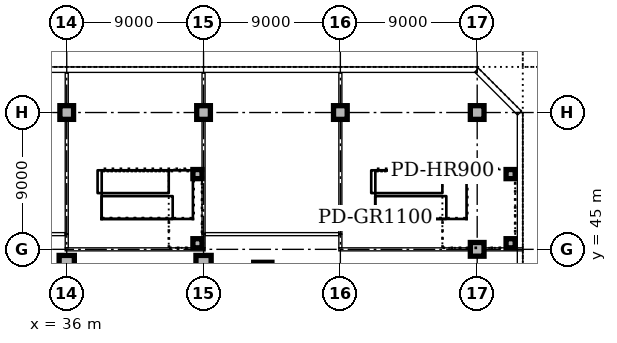
"""IFC4 building model, lengths in metres.
Left out: names, types, materials, properties, quantities, classifications, styles, units other than length and angle.
Written with IfcOpenShell. Run it as: python <this file> out.ifc"""

import sys

from ifc_helpers import new_model, si_unit, direction, frame, frame_2d, origin, origin_2d, place, context, subcontext, project, spatial, rectangle, extrude, element, fill, save


model = new_model("IFC4")
c1 = context("Model", 3, precision=1e-05, world=origin(), true_north=direction((0.0, 1.0)))
c2 = subcontext(c1, "Body", "Model", "MODEL_VIEW")
j1 = project(units=[si_unit("LENGTHUNIT", "METRE"), si_unit("PLANEANGLEUNIT", "RADIAN")], contexts=[c1])
p1 = place(None, origin())
s1 = spatial("IfcSite", under=j1, at=p1, CompositionType="ELEMENT")
p2 = place(p1, origin())
s2 = spatial("IfcBuilding", under=s1, at=p2, CompositionType="ELEMENT")
p3 = place(p2, origin())
s3 = spatial("IfcBuildingStorey", under=s2, at=p3, CompositionType="ELEMENT", Elevation=0.0)
p4 = place(p3, frame((48.898, 43.547, 0.0), z_axis=(0.0, 0.0, 1.0), x_axis=(1.0, 0.0, 0.0)))
e1 = element("IfcColumn", 1, at=p4, inside=s3, PredefinedType="COLUMN", context=c2, shape_type="SweptSolid", body=[
    extrude(rectangle(XDim=1.2, YDim=1.2, at=origin_2d()), origin(), (0.0, 0.0, 1.0), 5.7),
])
for number, where, z_axis, x_axis in (
    (2, (36.0, 44.1, 0.0), (0.0, 0.0, 1.0), (1.0, 0.0, 0.0)),
    (3, (45.0, 44.1, 0.0), (0.0, 0.0, 1.0), (1.0, 0.0, 0.0)),
):
    element("IfcColumn", number, at=place(p3, frame(where, z_axis=z_axis, x_axis=x_axis)), inside=s3, PredefinedType="COLUMN", context=c2, shape_type="SweptSolid", body=[
        extrude(rectangle(XDim=1.0, YDim=1.0, at=origin_2d()), origin(), (0.0, 0.0, 1.0), 5.7),
    ])
for number, where, z_axis, x_axis in (
    (4, (36.0, 54.0, 0.0), (0.0, 0.0, 1.0), (1.0, 0.0, 0.0)),
    (5, (45.0, 54.0, 0.0), (0.0, 0.0, 1.0), (1.0, 0.0, 0.0)),
    (6, (54.0, 54.0, 0.0), (0.0, 0.0, 1.0), (1.0, 0.0, 0.0)),
    (7, (63.0, 45.0, 0.0), (0.0, 0.0, 1.0), (1.0, 0.0, 0.0)),
    (8, (63.0, 54.0, 0.0), (0.0, 0.0, 1.0), (1.0, 0.0, 0.0)),
):
    element("IfcColumn", number, at=place(p3, frame(where, z_axis=z_axis, x_axis=x_axis)), inside=s3, PredefinedType="COLUMN", context=c2, shape_type="SweptSolid", body=[
        extrude(rectangle(XDim=0.9, YDim=0.9, at=origin_2d()), origin(), (0.0, 0.0, 1.0), 5.7),
    ])
p5 = place(p3, frame((65.82, -9.0, 0.0), z_axis=(0.0, 0.0, 1.0), x_axis=(0.0, 1.0, 0.0)))
e9 = element("IfcWall", 9, at=p5, inside=s3, PredefinedType="STANDARD", context=c2, shape_type="SweptSolid", body=[
    extrude(rectangle(XDim=63.0, YDim=0.36, at=frame_2d((31.5, 0.0))), origin(), (0.0, 0.0, 1.0), 5.7),
])
p6 = place(p5, frame((30.6, 0.0, 0.0)))
e10 = element("IfcOpeningElement", 10, at=p6, cuts=e9, PredefinedType="OPENING", context=c2, shape_type="SweptSolid", body=[
    extrude(rectangle(XDim=1.8, YDim=2.2, at=frame_2d((0.9, 1.1))), frame((0.0, 0.19, 0.0), z_axis=(0.0, -1.0, 0.0), x_axis=(1.0, 0.0, 0.0)), (0.0, 0.0, 1.0), 0.38),
])
p7 = place(p5, frame((51.6, 0.0, 0.0)))
e11 = element("IfcOpeningElement", 11, at=p7, cuts=e9, PredefinedType="OPENING", context=c2, shape_type="SweptSolid", body=[
    extrude(rectangle(XDim=1.8, YDim=2.2, at=frame_2d((0.9, 1.1))), frame((0.0, 0.19, 0.0), z_axis=(0.0, -1.0, 0.0), x_axis=(1.0, 0.0, 0.0)), (0.0, 0.0, 1.0), 0.38),
])
p8 = place(p5, frame((9.6, 0.0, 0.0)))
e12 = element("IfcOpeningElement", 12, at=p8, cuts=e9, PredefinedType="OPENING", context=c2, shape_type="SweptSolid", body=[
    extrude(rectangle(XDim=2.4, YDim=2.2, at=frame_2d((1.2, 1.1))), frame((0.0, 0.19, 0.0), z_axis=(0.0, -1.0, 0.0), x_axis=(1.0, 0.0, 0.0)), (0.0, 0.0, 1.0), 0.38),
])
p9 = place(p5, frame((2.85, 0.0, 0.6)))
e13 = element("IfcOpeningElement", 13, at=p9, cuts=e9, PredefinedType="OPENING", context=c2, shape_type="SweptSolid", body=[
    extrude(rectangle(XDim=3.3, YDim=3.0, at=frame_2d((1.65, 1.5))), frame((0.0, 0.19, 0.0), z_axis=(0.0, -1.0, 0.0), x_axis=(1.0, 0.0, 0.0)), (0.0, 0.0, 1.0), 0.38),
])
p10 = place(p5, frame((16.35, 0.0, 0.6)))
e14 = element("IfcOpeningElement", 14, at=p10, cuts=e9, PredefinedType="OPENING", context=c2, shape_type="SweptSolid", body=[
    extrude(rectangle(XDim=3.3, YDim=3.0, at=frame_2d((1.65, 1.5))), frame((0.0, 0.19, 0.0), z_axis=(0.0, -1.0, 0.0), x_axis=(1.0, 0.0, 0.0)), (0.0, 0.0, 1.0), 0.38),
])
p11 = place(p5, frame((20.85, 0.0, 0.6)))
e15 = element("IfcOpeningElement", 15, at=p11, cuts=e9, PredefinedType="OPENING", context=c2, shape_type="SweptSolid", body=[
    extrude(rectangle(XDim=3.3, YDim=3.0, at=frame_2d((1.65, 1.5))), frame((0.0, 0.19, 0.0), z_axis=(0.0, -1.0, 0.0), x_axis=(1.0, 0.0, 0.0)), (0.0, 0.0, 1.0), 0.38),
])
p12 = place(p5, frame((25.35, 0.0, 0.6)))
e16 = element("IfcOpeningElement", 16, at=p12, cuts=e9, PredefinedType="OPENING", context=c2, shape_type="SweptSolid", body=[
    extrude(rectangle(XDim=3.3, YDim=3.0, at=frame_2d((1.65, 1.5))), frame((0.0, 0.19, 0.0), z_axis=(0.0, -1.0, 0.0), x_axis=(1.0, 0.0, 0.0)), (0.0, 0.0, 1.0), 0.38),
])
p13 = place(p5, frame((34.35, 0.0, 0.6)))
e17 = element("IfcOpeningElement", 17, at=p13, cuts=e9, PredefinedType="OPENING", context=c2, shape_type="SweptSolid", body=[
    extrude(rectangle(XDim=3.3, YDim=3.0, at=frame_2d((1.65, 1.5))), frame((0.0, 0.19, 0.0), z_axis=(0.0, -1.0, 0.0), x_axis=(1.0, 0.0, 0.0)), (0.0, 0.0, 1.0), 0.38),
])
p14 = place(p5, frame((38.85, 0.0, 0.6)))
e18 = element("IfcOpeningElement", 18, at=p14, cuts=e9, PredefinedType="OPENING", context=c2, shape_type="SweptSolid", body=[
    extrude(rectangle(XDim=3.3, YDim=3.0, at=frame_2d((1.65, 1.5))), frame((0.0, 0.19, 0.0), z_axis=(0.0, -1.0, 0.0), x_axis=(1.0, 0.0, 0.0)), (0.0, 0.0, 1.0), 0.38),
])
p15 = place(p5, frame((43.35, 0.0, 0.6)))
e19 = element("IfcOpeningElement", 19, at=p15, cuts=e9, PredefinedType="OPENING", context=c2, shape_type="SweptSolid", body=[
    extrude(rectangle(XDim=3.3, YDim=3.0, at=frame_2d((1.65, 1.5))), frame((0.0, 0.19, 0.0), z_axis=(0.0, -1.0, 0.0), x_axis=(1.0, 0.0, 0.0)), (0.0, 0.0, 1.0), 0.38),
])
p16 = place(p5, frame((47.85, 0.0, 0.6)))
e20 = element("IfcOpeningElement", 20, at=p16, cuts=e9, PredefinedType="OPENING", context=c2, shape_type="SweptSolid", body=[
    extrude(rectangle(XDim=3.3, YDim=3.0, at=frame_2d((1.65, 1.5))), frame((0.0, 0.19, 0.0), z_axis=(0.0, -1.0, 0.0), x_axis=(1.0, 0.0, 0.0)), (0.0, 0.0, 1.0), 0.38),
])
p17 = place(p5, frame((56.85, 0.0, 0.6)))
e21 = element("IfcOpeningElement", 21, at=p17, cuts=e9, PredefinedType="OPENING", context=c2, shape_type="SweptSolid", body=[
    extrude(rectangle(XDim=3.3, YDim=3.0, at=frame_2d((1.65, 1.5))), frame((0.0, 0.19, 0.0), z_axis=(0.0, -1.0, 0.0), x_axis=(1.0, 0.0, 0.0)), (0.0, 0.0, 1.0), 0.38),
])
p18 = place(p3, frame((63.0, 56.82, 0.0), z_axis=(0.0, 0.0, 1.0), x_axis=(-1.0, 0.0, 0.0)))
e22 = element("IfcWall", 22, at=p18, inside=s3, PredefinedType="STANDARD", context=c2, shape_type="SweptSolid", body=[
    extrude(rectangle(XDim=57.4, YDim=0.36, at=frame_2d((28.7, 0.0))), origin(), (0.0, 0.0, 1.0), 5.7),
])
p19 = place(p18, frame((32.55, 0.0, 0.0)))
e23 = element("IfcOpeningElement", 23, at=p19, cuts=e22, PredefinedType="OPENING", context=c2, shape_type="SweptSolid", body=[
    extrude(rectangle(XDim=2.4, YDim=2.4, at=frame_2d((1.2, 1.2))), frame((0.0, 0.19, 0.0), z_axis=(0.0, -1.0, 0.0), x_axis=(1.0, 0.0, 0.0)), (0.0, 0.0, 1.0), 0.38),
])
p20 = place(p18, frame((48.3, 0.0, 0.0)))
e24 = element("IfcOpeningElement", 24, at=p20, cuts=e22, PredefinedType="OPENING", context=c2, shape_type="SweptSolid", body=[
    extrude(rectangle(XDim=2.4, YDim=2.2, at=frame_2d((1.2, 1.1))), frame((0.0, 0.19, 0.0), z_axis=(0.0, -1.0, 0.0), x_axis=(1.0, 0.0, 0.0)), (0.0, 0.0, 1.0), 0.38),
])
p21 = place(p18, frame((39.3, 0.0, 0.0)))
e25 = element("IfcOpeningElement", 25, at=p21, cuts=e22, PredefinedType="OPENING", context=c2, shape_type="SweptSolid", body=[
    extrude(rectangle(XDim=2.4, YDim=2.2, at=frame_2d((1.2, 1.1))), frame((0.0, 0.19, 0.0), z_axis=(0.0, -1.0, 0.0), x_axis=(1.0, 0.0, 0.0)), (0.0, 0.0, 1.0), 0.38),
])
p22 = place(p18, frame((12.3, 0.0, 0.0)))
e26 = element("IfcOpeningElement", 26, at=p22, cuts=e22, PredefinedType="OPENING", context=c2, shape_type="SweptSolid", body=[
    extrude(rectangle(XDim=2.4, YDim=2.2, at=frame_2d((1.2, 1.1))), frame((0.0, 0.19, 0.0), z_axis=(0.0, -1.0, 0.0), x_axis=(1.0, 0.0, 0.0)), (0.0, 0.0, 1.0), 0.38),
])
p23 = place(p18, frame((21.6, 0.0, 0.0)))
e27 = element("IfcOpeningElement", 27, at=p23, cuts=e22, PredefinedType="OPENING", context=c2, shape_type="SweptSolid", body=[
    extrude(rectangle(XDim=1.8, YDim=2.2, at=frame_2d((0.9, 1.1))), frame((0.0, 0.19, 0.0), z_axis=(0.0, -1.0, 0.0), x_axis=(1.0, 0.0, 0.0)), (0.0, 0.0, 1.0), 0.38),
])
p24 = place(p18, frame((2.1, 0.0, 0.0)))
e28 = element("IfcOpeningElement", 28, at=p24, cuts=e22, PredefinedType="OPENING", context=c2, shape_type="SweptSolid", body=[
    extrude(rectangle(XDim=1.8, YDim=2.2, at=frame_2d((0.9, 1.1))), frame((0.0, 0.19, 0.0), z_axis=(0.0, -1.0, 0.0), x_axis=(1.0, 0.0, 0.0)), (0.0, 0.0, 1.0), 0.38),
])
p25 = place(p18, frame((7.35, 0.0, 0.6)))
e29 = element("IfcOpeningElement", 29, at=p25, cuts=e22, PredefinedType="OPENING", context=c2, shape_type="SweptSolid", body=[
    extrude(rectangle(XDim=3.3, YDim=3.0, at=frame_2d((1.65, 1.5))), frame((0.0, 0.19, 0.0), z_axis=(0.0, -1.0, 0.0), x_axis=(1.0, 0.0, 0.0)), (0.0, 0.0, 1.0), 0.38),
])
p26 = place(p18, frame((16.35, 0.0, 0.6)))
e30 = element("IfcOpeningElement", 30, at=p26, cuts=e22, PredefinedType="OPENING", context=c2, shape_type="SweptSolid", body=[
    extrude(rectangle(XDim=3.3, YDim=3.0, at=frame_2d((1.65, 1.5))), frame((0.0, 0.19, 0.0), z_axis=(0.0, -1.0, 0.0), x_axis=(1.0, 0.0, 0.0)), (0.0, 0.0, 1.0), 0.38),
])
p27 = place(p18, frame((25.35, 0.0, 0.6)))
e31 = element("IfcOpeningElement", 31, at=p27, cuts=e22, PredefinedType="OPENING", context=c2, shape_type="SweptSolid", body=[
    extrude(rectangle(XDim=3.3, YDim=3.0, at=frame_2d((1.65, 1.5))), frame((0.0, 0.19, 0.0), z_axis=(0.0, -1.0, 0.0), x_axis=(1.0, 0.0, 0.0)), (0.0, 0.0, 1.0), 0.38),
])
p28 = place(p18, frame((43.35, 0.0, 0.6)))
e32 = element("IfcOpeningElement", 32, at=p28, cuts=e22, PredefinedType="OPENING", context=c2, shape_type="SweptSolid", body=[
    extrude(rectangle(XDim=3.3, YDim=3.0, at=frame_2d((1.65, 1.5))), frame((0.0, 0.19, 0.0), z_axis=(0.0, -1.0, 0.0), x_axis=(1.0, 0.0, 0.0)), (0.0, 0.0, 1.0), 0.38),
])
p29 = place(p18, frame((52.35, 0.0, 0.6)))
e33 = element("IfcOpeningElement", 33, at=p29, cuts=e22, PredefinedType="OPENING", context=c2, shape_type="SweptSolid", body=[
    extrude(rectangle(XDim=3.3, YDim=3.0, at=frame_2d((1.65, 1.5))), frame((0.0, 0.19, 0.0), z_axis=(0.0, -1.0, 0.0), x_axis=(1.0, 0.0, 0.0)), (0.0, 0.0, 1.0), 0.38),
])
p30 = place(p3, frame((65.784, 53.961, 0.0), z_axis=(0.0, 0.0, 1.0), x_axis=(-0.707106781187, 0.707106781187, 0.0)))
e34 = element("IfcWall", 34, at=p30, inside=s3, PredefinedType="STANDARD", context=c2, shape_type="SweptSolid", body=[
    extrude(rectangle(XDim=3.993, YDim=0.36, at=frame_2d((1.996, 0.0))), origin(), (0.0, 0.0, 1.0), 5.7),
])
for number, where, z_axis, x_axis in (
    (35, (65.2, 49.95, 0.0), (0.0, 0.0, 1.0), (1.0, 0.0, 0.0)),
    (36, (65.2, 45.4, 0.0), (0.0, 0.0, 1.0), (1.0, 0.0, 0.0)),
    (37, (44.6, 49.95, 0.0), (0.0, 0.0, 1.0), (1.0, 0.0, 0.0)),
    (38, (44.6, 45.4, 0.0), (0.0, 0.0, 1.0), (1.0, 0.0, 0.0)),
):
    element("IfcColumn", number, at=place(p3, frame(where, z_axis=z_axis, x_axis=x_axis)), inside=s3, PredefinedType="COLUMN", context=c2, shape_type="SweptSolid", body=[
        extrude(rectangle(XDim=0.6, YDim=0.6, at=origin_2d()), origin(), (0.0, 0.0, 1.0), 6.0),
    ])
p31 = place(p3, frame((54.0, 45.1, 0.0), z_axis=(0.0, 0.0, 1.0), x_axis=(0.0, 1.0, 0.0)))
e39 = element("IfcWall", 39, at=p31, inside=s3, PredefinedType="SOLIDWALL", context=c2, shape_type="SweptSolid", body=[
    extrude(rectangle(XDim=0.9, YDim=0.2, at=frame_2d((0.45, 0.0))), origin(), (0.0, 0.0, 1.0), 5.7),
])
p32 = place(p3, frame((53.9, 45.0, 0.0), z_axis=(0.0, 0.0, 1.0), x_axis=(1.0, 0.0, 0.0)))
e40 = element("IfcWall", 40, at=p32, inside=s3, PredefinedType="SOLIDWALL", context=c2, shape_type="SweptSolid", body=[
    extrude(rectangle(XDim=8.63, YDim=0.2, at=frame_2d((4.315, 0.0))), origin(), (0.0, 0.0, 1.0), 5.7),
])
p33 = place(p3, frame((63.47, 45.0, 0.0), z_axis=(0.0, 0.0, 1.0), x_axis=(1.0, 0.0, 0.0)))
e41 = element("IfcWall", 41, at=p33, inside=s3, PredefinedType="SOLIDWALL", context=c2, shape_type="SweptSolid", body=[
    extrude(rectangle(XDim=2.53, YDim=0.2, at=frame_2d((1.265, 0.0))), origin(), (0.0, 0.0, 1.0), 5.7),
])
p34 = place(p3, frame((54.0, 46.0, 0.0), z_axis=(0.0, 0.0, 1.0), x_axis=(0.0, 1.0, 0.0)))
e42 = element("IfcWall", 42, at=p34, inside=s3, PredefinedType="SOLIDWALL", context=c2, shape_type="SweptSolid", body=[
    extrude(rectangle(XDim=7.53, YDim=0.2, at=frame_2d((3.765, 0.0))), origin(), (0.0, 0.0, 1.0), 5.7),
])
p35 = place(p3, frame((54.0, 54.47, 0.0), z_axis=(0.0, 0.0, 1.0), x_axis=(0.0, 1.0, 0.0)))
e43 = element("IfcWall", 43, at=p35, inside=s3, PredefinedType="SOLIDWALL", context=c2, shape_type="SweptSolid", body=[
    extrude(rectangle(XDim=2.13, YDim=0.2, at=frame_2d((1.065, 0.0))), origin(), (0.0, 0.0, 1.0), 5.7),
])
for number, where, z_axis, x_axis in (
    (44, (36.0, 45.1, 0.0), (0.0, 0.0, 1.0), (0.0, 1.0, 0.0)),
    (45, (45.0, 45.1, 0.0), (0.0, 0.0, 1.0), (0.0, 1.0, 0.0)),
):
    element("IfcWall", number, at=place(p3, frame(where, z_axis=z_axis, x_axis=x_axis)), inside=s3, PredefinedType="SOLIDWALL", context=c2, shape_type="SweptSolid", body=[
        extrude(rectangle(XDim=0.9, YDim=0.2, at=frame_2d((0.45, 0.0))), origin(), (0.0, 0.0, 1.0), 5.7),
    ])
p36 = place(p3, frame((35.9, 45.0, 0.0), z_axis=(0.0, 0.0, 1.0), x_axis=(1.0, 0.0, 0.0)))
e46 = element("IfcWall", 46, at=p36, inside=s3, PredefinedType="SOLIDWALL", context=c2, shape_type="SweptSolid", body=[
    extrude(rectangle(XDim=9.2, YDim=0.2, at=frame_2d((4.6, 0.0))), origin(), (0.0, 0.0, 1.0), 5.7),
])
p37 = place(p3, frame((36.0, 46.0, 0.0), z_axis=(0.0, 0.0, 1.0), x_axis=(0.0, 1.0, 0.0)))
e47 = element("IfcWall", 47, at=p37, inside=s3, PredefinedType="SOLIDWALL", context=c2, shape_type="SweptSolid", body=[
    extrude(rectangle(XDim=7.53, YDim=0.2, at=frame_2d((3.765, 0.0))), origin(), (0.0, 0.0, 1.0), 5.7),
])
p38 = place(p3, frame((36.0, 54.47, 0.0), z_axis=(0.0, 0.0, 1.0), x_axis=(0.0, 1.0, 0.0)))
e48 = element("IfcWall", 48, at=p38, inside=s3, PredefinedType="SOLIDWALL", context=c2, shape_type="SweptSolid", body=[
    extrude(rectangle(XDim=2.13, YDim=0.2, at=frame_2d((1.065, 0.0))), origin(), (0.0, 0.0, 1.0), 5.7),
])
p39 = place(p3, frame((45.0, 46.0, 0.0), z_axis=(0.0, 0.0, 1.0), x_axis=(0.0, 1.0, 0.0)))
e49 = element("IfcWall", 49, at=p39, inside=s3, PredefinedType="SOLIDWALL", context=c2, shape_type="SweptSolid", body=[
    extrude(rectangle(XDim=7.53, YDim=0.2, at=frame_2d((3.765, 0.0))), origin(), (0.0, 0.0, 1.0), 5.7),
])
p40 = place(p3, frame((45.0, 54.47, 0.0), z_axis=(0.0, 0.0, 1.0), x_axis=(0.0, 1.0, 0.0)))
e50 = element("IfcWall", 50, at=p40, inside=s3, PredefinedType="SOLIDWALL", context=c2, shape_type="SweptSolid", body=[
    extrude(rectangle(XDim=2.13, YDim=0.2, at=frame_2d((1.065, 0.0))), origin(), (0.0, 0.0, 1.0), 5.7),
])
p41 = place(p3, frame((27.0, 46.0, 0.0), z_axis=(0.0, 0.0, 1.0), x_axis=(1.0, 0.0, 0.0)))
e51 = element("IfcWall", 51, at=p41, inside=s3, PredefinedType="PARTITIONING", context=c2, shape_type="SweptSolid", body=[
    extrude(rectangle(XDim=8.9, YDim=0.2, at=frame_2d((4.45, 0.0))), origin(), (0.0, 0.0, 1.0), 5.7),
])
p42 = place(p3, frame((45.1, 46.0, 0.0), z_axis=(0.0, 0.0, 1.0), x_axis=(1.0, 0.0, 0.0)))
e52 = element("IfcWall", 52, at=p42, inside=s3, PredefinedType="PARTITIONING", context=c2, shape_type="SweptSolid", body=[
    extrude(rectangle(XDim=8.8, YDim=0.2, at=frame_2d((4.4, 0.0))), origin(), (0.0, 0.0, 1.0), 5.7),
])
p43 = place(p42, frame((3.9, 0.0, 0.0)))
e53 = element("IfcOpeningElement", 53, at=p43, cuts=e52, PredefinedType="OPENING", context=c2, shape_type="SweptSolid", body=[
    extrude(rectangle(XDim=1.0, YDim=2.1, at=frame_2d((0.5, 1.05))), frame((0.0, 0.11, 0.0), z_axis=(0.0, -1.0, 0.0), x_axis=(1.0, 0.0, 0.0)), (0.0, 0.0, 1.0), 0.22),
])
p44 = place(p7, frame((1.8, 0.0, 0.0), z_axis=(0.0, 0.0, 1.0), x_axis=(-1.0, 0.0, 0.0)))
e54 = element("IfcDoor", 54, at=p44, inside=s3, OperationType="DOUBLE_DOOR_SINGLE_SWING", PredefinedType="DOOR", context=c2, shape_type="SweptSolid", body=[
    extrude(rectangle(XDim=1.8, YDim=2.2, at=frame_2d((0.9, 1.1))), frame((0.0, -0.07, 0.0), z_axis=(0.0, -1.0, 0.0), x_axis=(1.0, 0.0, 0.0)), (0.0, 0.0, 1.0), 0.05),
])
fill(e11, e54)
p45 = place(p17, origin())
e55 = element("IfcWindow", 55, at=p45, inside=s3, PartitioningType="SINGLE_PANEL", PredefinedType="WINDOW", context=c2, shape_type="SweptSolid", body=[
    extrude(rectangle(XDim=3.3, YDim=3.0, at=frame_2d((1.65, 1.5))), frame((0.0, 0.13, 0.0), z_axis=(0.0, -1.0, 0.0), x_axis=(1.0, 0.0, 0.0)), (0.0, 0.0, 1.0), 0.06),
])
fill(e21, e55)
p46 = place(p22, frame((2.4, 0.0, 0.0), z_axis=(0.0, 0.0, 1.0), x_axis=(-1.0, 0.0, 0.0)))
e56 = element("IfcDoor", 56, at=p46, inside=s3, OperationType="DOUBLE_DOOR_SINGLE_SWING", PredefinedType="DOOR", context=c2, shape_type="SweptSolid", body=[
    extrude(rectangle(XDim=2.4, YDim=2.2, at=frame_2d((1.2, 1.1))), frame((0.0, -0.07, 0.0), z_axis=(0.0, -1.0, 0.0), x_axis=(1.0, 0.0, 0.0)), (0.0, 0.0, 1.0), 0.05),
])
fill(e26, e56)
p47 = place(p23, frame((1.8, 0.0, 0.0), z_axis=(0.0, 0.0, 1.0), x_axis=(-1.0, 0.0, 0.0)))
e57 = element("IfcDoor", 57, at=p47, inside=s3, OperationType="DOUBLE_DOOR_SINGLE_SWING", PredefinedType="DOOR", context=c2, shape_type="SweptSolid", body=[
    extrude(rectangle(XDim=1.8, YDim=2.2, at=frame_2d((0.9, 1.1))), frame((0.0, -0.07, 0.0), z_axis=(0.0, -1.0, 0.0), x_axis=(1.0, 0.0, 0.0)), (0.0, 0.0, 1.0), 0.05),
])
fill(e27, e57)
p48 = place(p24, frame((1.8, 0.0, 0.0), z_axis=(0.0, 0.0, 1.0), x_axis=(-1.0, 0.0, 0.0)))
e58 = element("IfcDoor", 58, at=p48, inside=s3, OperationType="DOUBLE_DOOR_SINGLE_SWING", PredefinedType="DOOR", context=c2, shape_type="SweptSolid", body=[
    extrude(rectangle(XDim=1.8, YDim=2.2, at=frame_2d((0.9, 1.1))), frame((0.0, -0.07, 0.0), z_axis=(0.0, -1.0, 0.0), x_axis=(1.0, 0.0, 0.0)), (0.0, 0.0, 1.0), 0.05),
])
fill(e28, e58)
p49 = place(p25, origin())
e59 = element("IfcWindow", 59, at=p49, inside=s3, PartitioningType="SINGLE_PANEL", PredefinedType="WINDOW", context=c2, shape_type="SweptSolid", body=[
    extrude(rectangle(XDim=3.3, YDim=3.0, at=frame_2d((1.65, 1.5))), frame((0.0, 0.13, 0.0), z_axis=(0.0, -1.0, 0.0), x_axis=(1.0, 0.0, 0.0)), (0.0, 0.0, 1.0), 0.06),
])
fill(e29, e59)
p50 = place(p26, origin())
e60 = element("IfcWindow", 60, at=p50, inside=s3, PartitioningType="SINGLE_PANEL", PredefinedType="WINDOW", context=c2, shape_type="SweptSolid", body=[
    extrude(rectangle(XDim=3.3, YDim=3.0, at=frame_2d((1.65, 1.5))), frame((0.0, 0.13, 0.0), z_axis=(0.0, -1.0, 0.0), x_axis=(1.0, 0.0, 0.0)), (0.0, 0.0, 1.0), 0.06),
])
fill(e30, e60)
p51 = place(p27, origin())
e61 = element("IfcWindow", 61, at=p51, inside=s3, PartitioningType="SINGLE_PANEL", PredefinedType="WINDOW", context=c2, shape_type="SweptSolid", body=[
    extrude(rectangle(XDim=3.3, YDim=3.0, at=frame_2d((1.65, 1.5))), frame((0.0, 0.13, 0.0), z_axis=(0.0, -1.0, 0.0), x_axis=(1.0, 0.0, 0.0)), (0.0, 0.0, 1.0), 0.06),
])
fill(e31, e61)
p52 = place(p43, origin())
e62 = element("IfcDoor", 62, at=p52, inside=s3, OperationType="SINGLE_SWING_RIGHT", PredefinedType="DOOR", context=c2, shape_type="SweptSolid", body=[
    extrude(rectangle(XDim=1.0, YDim=2.1, at=frame_2d((0.5, 1.05))), frame((0.0, 0.025, 0.0), z_axis=(0.0, -1.0, 0.0), x_axis=(1.0, 0.0, 0.0)), (0.0, 0.0, 1.0), 0.05),
])
fill(e53, e62)
save(model, sys.argv[1])
